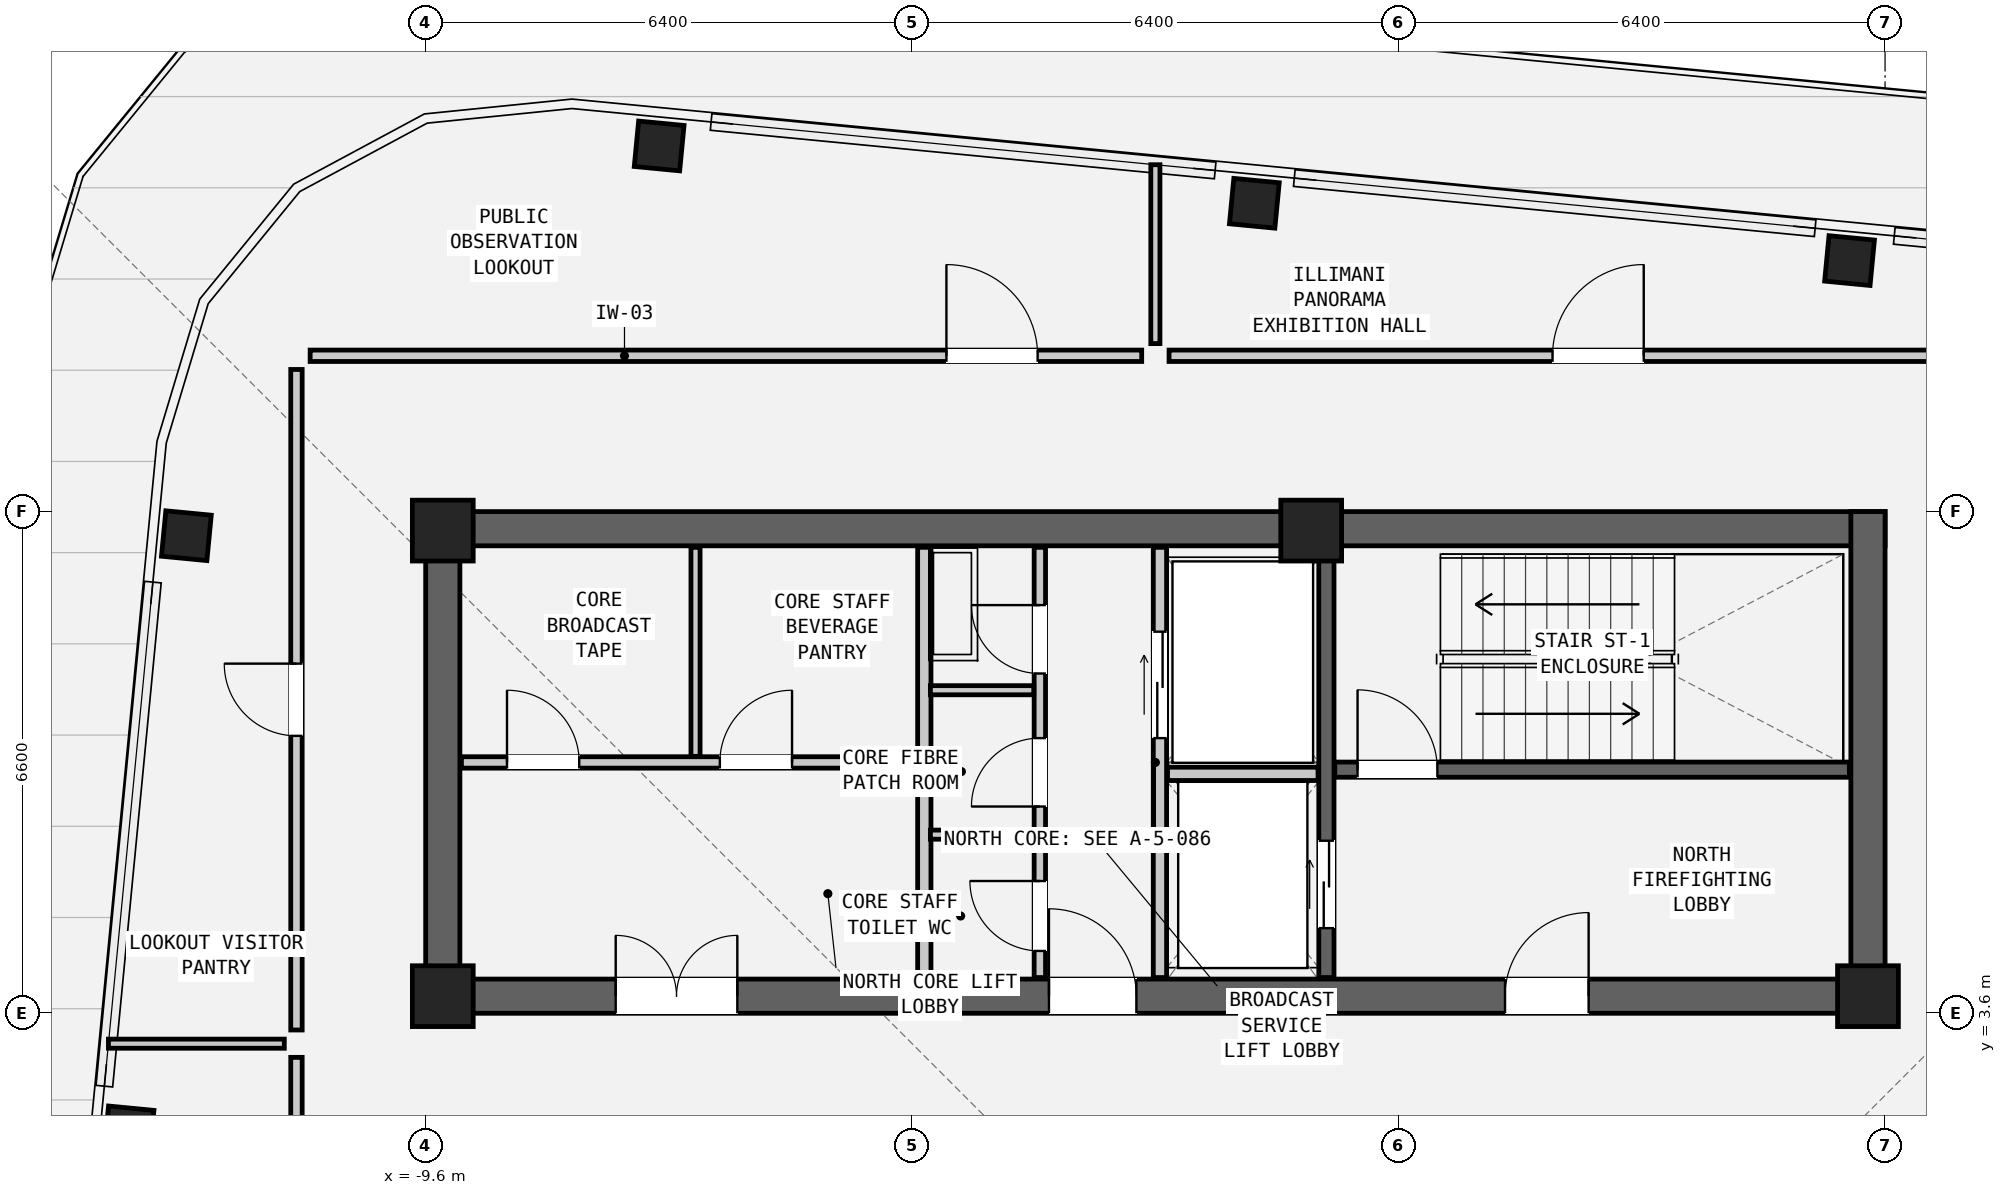
"""IFC4 building model, lengths in metres.
Left out: names, types, materials, properties, quantities, classifications, styles, units other than length and angle.
Written with IfcOpenShell. Run it as: python <this file> out.ifc"""

import sys

from ifc_helpers import new_model, si_unit, direction, frame, frame_2d, origin, origin_2d, place, context, subcontext, project, spatial, rectangle, hollow_rectangle, extrude, element, fill, save


model = new_model("IFC4")
c1 = context("Model", 3, precision=1e-05, world=origin(), true_north=direction((0.0, 1.0)))
c2 = subcontext(c1, "Body", "Model", "MODEL_VIEW")
j1 = project(units=[si_unit("LENGTHUNIT", "METRE"), si_unit("PLANEANGLEUNIT", "RADIAN")], contexts=[c1])
p1 = place(None, origin())
s1 = spatial("IfcSite", under=j1, at=p1, CompositionType="ELEMENT")
p2 = place(p1, origin())
s2 = spatial("IfcBuilding", under=s1, at=p2, CompositionType="ELEMENT")
p3 = place(p2, frame((0.0, 0.0, 280.55)))
s3 = spatial("IfcBuildingStorey", under=s2, at=p3, CompositionType="ELEMENT", Elevation=280.55)
p4 = place(p3, frame((-9.6, 9.975, 0.0), z_axis=(0.0, 0.0, 1.0), x_axis=(1.0, 0.0, 0.0)))
e1 = element("IfcWall", 1, at=p4, inside=s3, PredefinedType="SHEAR", context=c2, shape_type="SweptSolid", body=[
    extrude(rectangle(XDim=19.2, YDim=0.45, at=frame_2d((9.6, 0.0))), origin(), (0.0, 0.0, 1.0), 4.35),
])
p5 = place(p3, frame((-9.6, 3.825, 0.0), z_axis=(0.0, 0.0, 1.0), x_axis=(1.0, 0.0, 0.0)))
e2 = element("IfcWall", 2, at=p5, inside=s3, PredefinedType="SHEAR", context=c2, shape_type="SweptSolid", body=[
    extrude(rectangle(XDim=19.2, YDim=0.45, at=frame_2d((9.6, 0.0))), origin(), (0.0, 0.0, 1.0), 4.35),
])
p6 = place(p5, frame((14.2, 0.0, 0.0)))
e3 = element("IfcOpeningElement", 3, at=p6, cuts=e2, PredefinedType="OPENING", context=c2, shape_type="SweptSolid", body=[
    extrude(rectangle(XDim=1.1, YDim=2.08, at=frame_2d((0.55, 1.04))), frame((0.0, 0.237, 0.0), z_axis=(0.0, -1.0, 0.0), x_axis=(1.0, 0.0, 0.0)), (0.0, 0.0, 1.0), 0.474),
])
p7 = place(p5, frame((8.2, 0.0, 0.0)))
e4 = element("IfcOpeningElement", 4, at=p7, cuts=e2, PredefinedType="OPENING", context=c2, shape_type="SweptSolid", body=[
    extrude(rectangle(XDim=1.15, YDim=2.1, at=frame_2d((0.575, 1.05))), frame((0.0, 0.237, 0.0), z_axis=(0.0, -1.0, 0.0), x_axis=(1.0, 0.0, 0.0)), (0.0, 0.0, 1.0), 0.474),
])
p8 = place(p5, frame((2.5, 0.0, 0.0)))
e5 = element("IfcOpeningElement", 5, at=p8, cuts=e2, PredefinedType="OPENING", context=c2, shape_type="SweptSolid", body=[
    extrude(rectangle(XDim=1.6, YDim=2.12, at=frame_2d((0.8, 1.06))), frame((0.0, 0.237, 0.0), z_axis=(0.0, -1.0, 0.0), x_axis=(1.0, 0.0, 0.0)), (0.0, 0.0, 1.0), 0.474),
])
for number, where, z_axis, x_axis in (
    (6, (-9.375, 3.6, 0.0), (0.0, 0.0, 1.0), (0.0, 1.0, 0.0)),
    (7, (9.375, 3.6, 0.0), (0.0, 0.0, 1.0), (0.0, 1.0, 0.0)),
):
    element("IfcWall", number, at=place(p3, frame(where, z_axis=z_axis, x_axis=x_axis)), inside=s3, PredefinedType="SHEAR", context=c2, shape_type="SweptSolid", body=[
        extrude(rectangle(XDim=6.6, YDim=0.45, at=frame_2d((3.3, 0.0))), origin(), (0.0, 0.0, 1.0), 4.35),
    ])
for number, where, z_axis, x_axis in (
    (8, (9.133, 13.502, 0.0), (0.0, 0.0, 1.0), (0.995, -0.096, 0.0)),
    (9, (1.302, 14.256, 0.0), (0.0, 0.0, 1.0), (0.995, -0.096, 0.0)),
    (10, (-6.528, 15.01, 0.0), (0.0, 0.0, 1.0), (0.995, -0.096, 0.0)),
    (11, (-12.749, 9.883, 0.0), (0.0, 0.0, 1.0), (0.096, 0.995, 0.0)),
    (12, (-13.502, 2.052, 0.0), (0.0, 0.0, 1.0), (0.096, 0.995, 0.0)),
):
    element("IfcColumn", number, at=place(p3, frame(where, z_axis=z_axis, x_axis=x_axis)), inside=s3, PredefinedType="COLUMN", context=c2, shape_type="SweptSolid", body=[
        extrude(hollow_rectangle(XDim=0.6, YDim=0.6, WallThickness=0.04, at=origin_2d()), origin(), (0.0, 0.0, 1.0), 4.35),
    ])
for number, where, z_axis, x_axis in (
    (13, (-9.375, 9.95, 0.0), (0.0, 0.0, 1.0), (1.0, 0.0, 0.0)),
    (14, (2.05, 9.95, 0.0), (0.0, 0.0, 1.0), (1.0, 0.0, 0.0)),
    (15, (-9.375, 3.825, 0.0), (0.0, 0.0, 1.0), (1.0, 0.0, 0.0)),
    (16, (9.375, 3.825, 0.0), (0.0, 0.0, 1.0), (1.0, 0.0, 0.0)),
):
    element("IfcColumn", number, at=place(p3, frame(where, z_axis=z_axis, x_axis=x_axis)), inside=s3, PredefinedType="COLUMN", context=c2, shape_type="SweptSolid", body=[
        extrude(rectangle(XDim=0.8, YDim=0.8, at=origin_2d()), origin(), (0.0, 0.0, 1.0), 4.35),
    ])
p9 = place(p3, frame((2.36, 6.805, 0.0), z_axis=(0.0, 0.0, 1.0), x_axis=(1.0, 0.0, 0.0)))
e17 = element("IfcWall", 17, at=p9, inside=s3, PredefinedType="SHEAR", context=c2, shape_type="SweptSolid", body=[
    extrude(rectangle(XDim=6.77, YDim=0.2, at=frame_2d((3.385, 0.0))), origin(), (0.0, 0.0, 1.0), 4.07),
])
p10 = place(p9, frame((0.3, 0.0, 0.0)))
e18 = element("IfcOpeningElement", 18, at=p10, cuts=e17, PredefinedType="OPENING", context=c2, shape_type="SweptSolid", body=[
    extrude(rectangle(XDim=1.05, YDim=2.08, at=frame_2d((0.525, 1.04))), frame((0.0, 0.112, 0.0), z_axis=(0.0, -1.0, 0.0), x_axis=(1.0, 0.0, 0.0)), (0.0, 0.0, 1.0), 0.224),
])
p11 = place(p3, frame((2.25, 4.07, 0.0), z_axis=(0.0, 0.0, 1.0), x_axis=(0.0, 1.0, 0.0)))
e19 = element("IfcWall", 19, at=p11, inside=s3, PredefinedType="SHEAR", context=c2, shape_type="SweptSolid", body=[
    extrude(rectangle(XDim=5.66, YDim=0.2, at=frame_2d((2.83, 0.0))), origin(), (0.0, 0.0, 1.0), 4.07),
])
p12 = place(p11, frame((0.65, 0.0, 0.0)))
e20 = element("IfcOpeningElement", 20, at=p12, cuts=e19, PredefinedType="OPENING", context=c2, shape_type="SweptSolid", body=[
    extrude(rectangle(XDim=1.15, YDim=2.08, at=frame_2d((0.575, 1.04))), frame((0.0, 0.112, 0.0), z_axis=(0.0, -1.0, 0.0), x_axis=(1.0, 0.0, 0.0)), (0.0, 0.0, 1.0), 0.224),
])
p13 = place(p3, frame((0.06, 4.07, 0.0), z_axis=(0.0, 0.0, 1.0), x_axis=(0.0, 1.0, 0.0)))
e21 = element("IfcWall", 21, at=p13, inside=s3, PredefinedType="PARTITIONING", context=c2, shape_type="SweptSolid", body=[
    extrude(rectangle(XDim=5.66, YDim=0.175, at=frame_2d((2.83, 0.0))), origin(), (0.0, 0.0, 1.0), 4.07),
])
p14 = place(p13, frame((3.15, 0.0, 0.0)))
e22 = element("IfcOpeningElement", 22, at=p14, cuts=e21, PredefinedType="OPENING", context=c2, shape_type="SweptSolid", body=[
    extrude(rectangle(XDim=1.4, YDim=2.12, at=frame_2d((0.7, 1.06))), frame((0.0, 0.1, 0.0), z_axis=(0.0, -1.0, 0.0), x_axis=(1.0, 0.0, 0.0)), (0.0, 0.0, 1.0), 0.199),
])
p15 = place(p3, frame((0.16, 6.75, 0.0), z_axis=(0.0, 0.0, 1.0), x_axis=(1.0, 0.0, 0.0)))
e23 = element("IfcWall", 23, at=p15, inside=s3, PredefinedType="PARTITIONING", context=c2, shape_type="SweptSolid", body=[
    extrude(rectangle(XDim=1.98, YDim=0.175, at=frame_2d((0.99, 0.0))), origin(), (0.0, 0.0, 1.0), 4.07),
])
p16 = place(p3, frame((-3.04, 4.07, 0.0), z_axis=(0.0, 0.0, 1.0), x_axis=(0.0, 1.0, 0.0)))
e24 = element("IfcWall", 24, at=p16, inside=s3, PredefinedType="PARTITIONING", context=c2, shape_type="SweptSolid", body=[
    extrude(rectangle(XDim=5.66, YDim=0.175, at=frame_2d((2.83, 0.0))), origin(), (0.0, 0.0, 1.0), 4.07),
])
p17 = place(p3, frame((-1.52, 4.07, 0.0), z_axis=(0.0, 0.0, 1.0), x_axis=(0.0, 1.0, 0.0)))
e25 = element("IfcWall", 25, at=p17, inside=s3, PredefinedType="PARTITIONING", context=c2, shape_type="SweptSolid", body=[
    extrude(rectangle(XDim=5.66, YDim=0.15, at=frame_2d((2.83, 0.0))), origin(), (0.0, 0.0, 1.0), 4.07),
])
p18 = place(p17, frame((4.0, 0.0, 0.0)))
e26 = element("IfcOpeningElement", 26, at=p18, cuts=e25, PredefinedType="OPENING", context=c2, shape_type="SweptSolid", body=[
    extrude(rectangle(XDim=0.9, YDim=2.05, at=frame_2d((0.45, 1.025))), frame((0.0, 0.087, 0.0), z_axis=(0.0, -1.0, 0.0), x_axis=(1.0, 0.0, 0.0)), (0.0, 0.0, 1.0), 0.174),
])
p19 = place(p17, frame((2.25, 0.0, 0.0)))
e27 = element("IfcOpeningElement", 27, at=p19, cuts=e25, PredefinedType="OPENING", context=c2, shape_type="SweptSolid", body=[
    extrude(rectangle(XDim=0.9, YDim=2.05, at=frame_2d((0.45, 1.025))), frame((0.0, 0.087, 0.0), z_axis=(0.0, -1.0, 0.0), x_axis=(1.0, 0.0, 0.0)), (0.0, 0.0, 1.0), 0.174),
])
p20 = place(p17, frame((0.35, 0.0, 0.0)))
e28 = element("IfcOpeningElement", 28, at=p20, cuts=e25, PredefinedType="OPENING", context=c2, shape_type="SweptSolid", body=[
    extrude(rectangle(XDim=0.92, YDim=2.1, at=frame_2d((0.46, 1.05))), frame((0.0, 0.087, 0.0), z_axis=(0.0, -1.0, 0.0), x_axis=(1.0, 0.0, 0.0)), (0.0, 0.0, 1.0), 0.174),
])
for number, where, z_axis, x_axis in (
    (29, (-2.96, 5.95, 0.0), (0.0, 0.0, 1.0), (1.0, 0.0, 0.0)),
    (30, (-2.96, 7.85, 0.0), (0.0, 0.0, 1.0), (1.0, 0.0, 0.0)),
):
    element("IfcWall", number, at=place(p3, frame(where, z_axis=z_axis, x_axis=x_axis)), inside=s3, PredefinedType="PARTITIONING", context=c2, shape_type="SweptSolid", body=[
        extrude(rectangle(XDim=1.36, YDim=0.12, at=frame_2d((0.68, 0.0))), origin(), (0.0, 0.0, 1.0), 4.07),
    ])
p21 = place(p3, frame((-9.13, 6.9, 0.0), z_axis=(0.0, 0.0, 1.0), x_axis=(1.0, 0.0, 0.0)))
e31 = element("IfcWall", 31, at=p21, inside=s3, PredefinedType="PARTITIONING", context=c2, shape_type="SweptSolid", body=[
    extrude(rectangle(XDim=6.01, YDim=0.15, at=frame_2d((3.005, 0.0))), origin(), (0.0, 0.0, 1.0), 4.07),
])
p22 = place(p21, frame((0.6, 0.0, 0.0)))
e32 = element("IfcOpeningElement", 32, at=p22, cuts=e31, PredefinedType="OPENING", context=c2, shape_type="SweptSolid", body=[
    extrude(rectangle(XDim=0.95, YDim=2.1, at=frame_2d((0.475, 1.05))), frame((0.0, 0.087, 0.0), z_axis=(0.0, -1.0, 0.0), x_axis=(1.0, 0.0, 0.0)), (0.0, 0.0, 1.0), 0.174),
])
p23 = place(p21, frame((3.4, 0.0, 0.0)))
e33 = element("IfcOpeningElement", 33, at=p23, cuts=e31, PredefinedType="OPENING", context=c2, shape_type="SweptSolid", body=[
    extrude(rectangle(XDim=0.95, YDim=2.1, at=frame_2d((0.475, 1.05))), frame((0.0, 0.087, 0.0), z_axis=(0.0, -1.0, 0.0), x_axis=(1.0, 0.0, 0.0)), (0.0, 0.0, 1.0), 0.174),
])
p24 = place(p3, frame((-6.05, 6.98, 0.0), z_axis=(0.0, 0.0, 1.0), x_axis=(0.0, 1.0, 0.0)))
e34 = element("IfcWall", 34, at=p24, inside=s3, PredefinedType="PARTITIONING", context=c2, shape_type="SweptSolid", body=[
    extrude(rectangle(XDim=2.75, YDim=0.12, at=frame_2d((1.375, 0.0))), origin(), (0.0, 0.0, 1.0), 4.07),
])
p25 = place(p3, frame((0.0, 12.41, 0.0), z_axis=(0.0, 0.0, 1.0), x_axis=(0.0, 1.0, 0.0)))
e35 = element("IfcWall", 35, at=p25, inside=s3, PredefinedType="PARTITIONING", context=c2, shape_type="SweptSolid", body=[
    extrude(rectangle(XDim=2.354, YDim=0.12, at=frame_2d((1.177, 0.0))), origin(), (0.0, 0.0, 1.0), 2.25),
])
p26 = place(p3, frame((-13.774, 3.2, 0.0), z_axis=(0.0, 0.0, 1.0), x_axis=(1.0, 0.0, 0.0)))
e36 = element("IfcWall", 36, at=p26, inside=s3, PredefinedType="PARTITIONING", context=c2, shape_type="SweptSolid", body=[
    extrude(rectangle(XDim=2.314, YDim=0.12, at=frame_2d((1.157, 0.0))), origin(), (0.0, 0.0, 1.0), 4.07),
])
p27 = place(p3, frame((-11.12, 12.25, 0.0), z_axis=(0.0, 0.0, 1.0), x_axis=(1.0, 0.0, 0.0)))
e37 = element("IfcWall", 37, at=p27, inside=s3, PredefinedType="PARTITIONING", context=c2, shape_type="SweptSolid", body=[
    extrude(rectangle(XDim=10.94, YDim=0.15, at=frame_2d((5.47, 0.0))), origin(), (0.0, 0.0, 1.0), 4.07),
])
p28 = place(p27, frame((8.371, 0.0, 0.0)))
e38 = element("IfcOpeningElement", 38, at=p28, cuts=e37, PredefinedType="OPENING", context=c2, shape_type="SweptSolid", body=[
    extrude(rectangle(XDim=1.2, YDim=2.1, at=frame_2d((0.6, 1.05))), frame((0.0, 0.087, 0.0), z_axis=(0.0, -1.0, 0.0), x_axis=(1.0, 0.0, 0.0)), (0.0, 0.0, 1.0), 0.174),
])
p29 = place(p3, frame((0.18, 12.25, 0.0), z_axis=(0.0, 0.0, 1.0), x_axis=(1.0, 0.0, 0.0)))
e39 = element("IfcWall", 39, at=p29, inside=s3, PredefinedType="PARTITIONING", context=c2, shape_type="SweptSolid", body=[
    extrude(rectangle(XDim=11.29, YDim=0.15, at=frame_2d((5.645, 0.0))), origin(), (0.0, 0.0, 1.0), 2.25),
])
p30 = place(p29, frame((5.045, 0.0, 0.0)))
e40 = element("IfcOpeningElement", 40, at=p30, cuts=e39, PredefinedType="OPENING", context=c2, shape_type="SweptSolid", body=[
    extrude(rectangle(XDim=1.2, YDim=2.1, at=frame_2d((0.6, 1.05))), frame((0.0, 0.087, 0.0), z_axis=(0.0, -1.0, 0.0), x_axis=(1.0, 0.0, 0.0)), (0.0, 0.0, 1.0), 0.174),
])
p31 = place(p3, frame((-11.3, -2.82, 0.0), z_axis=(0.0, 0.0, 1.0), x_axis=(0.0, 1.0, 0.0)))
e41 = element("IfcWall", 41, at=p31, inside=s3, PredefinedType="PARTITIONING", context=c2, shape_type="SweptSolid", body=[
    extrude(rectangle(XDim=5.84, YDim=0.15, at=frame_2d((2.92, 0.0))), origin(), (0.0, 0.0, 1.0), 4.07),
])
p32 = place(p31, frame((2.32, 0.0, 0.0)))
e42 = element("IfcOpeningElement", 42, at=p32, cuts=e41, PredefinedType="OPENING", context=c2, shape_type="SweptSolid", body=[
    extrude(rectangle(XDim=1.2, YDim=2.1, at=frame_2d((0.6, 1.05))), frame((0.0, 0.087, 0.0), z_axis=(0.0, -1.0, 0.0), x_axis=(1.0, 0.0, 0.0)), (0.0, 0.0, 1.0), 0.174),
])
p33 = place(p3, frame((-11.3, 3.38, 0.0), z_axis=(0.0, 0.0, 1.0), x_axis=(0.0, 1.0, 0.0)))
e43 = element("IfcWall", 43, at=p33, inside=s3, PredefinedType="PARTITIONING", context=c2, shape_type="SweptSolid", body=[
    extrude(rectangle(XDim=8.69, YDim=0.15, at=frame_2d((4.345, 0.0))), origin(), (0.0, 0.0, 1.0), 4.07),
])
p34 = place(p33, frame((3.87, 0.0, 0.0)))
e44 = element("IfcOpeningElement", 44, at=p34, cuts=e43, PredefinedType="OPENING", context=c2, shape_type="SweptSolid", body=[
    extrude(rectangle(XDim=0.95, YDim=2.1, at=frame_2d((0.475, 1.05))), frame((0.0, 0.087, 0.0), z_axis=(0.0, -1.0, 0.0), x_axis=(1.0, 0.0, 0.0)), (0.0, 0.0, 1.0), 0.174),
])
p35 = place(p10, origin())
e45 = element("IfcDoor", 45, at=p35, inside=s3, OperationType="SINGLE_SWING_LEFT", PredefinedType="DOOR", context=c2, shape_type="SweptSolid", body=[
    extrude(rectangle(XDim=1.05, YDim=2.08, at=frame_2d((0.525, 1.04))), frame((0.0, 0.025, 0.0), z_axis=(0.0, -1.0, 0.0), x_axis=(1.0, 0.0, 0.0)), (0.0, 0.0, 1.0), 0.05),
])
fill(e18, e45)
p36 = place(p6, origin())
e46 = element("IfcDoor", 46, at=p36, inside=s3, OperationType="SINGLE_SWING_RIGHT", PredefinedType="DOOR", context=c2, shape_type="SweptSolid", body=[
    extrude(rectangle(XDim=1.1, YDim=2.08, at=frame_2d((0.55, 1.04))), frame((0.0, 0.025, 0.0), z_axis=(0.0, -1.0, 0.0), x_axis=(1.0, 0.0, 0.0)), (0.0, 0.0, 1.0), 0.05),
])
fill(e3, e46)
p37 = place(p12, origin())
e47 = element("IfcDoor", 47, at=p37, inside=s3, OperationType="DOUBLE_DOOR_SLIDING", PredefinedType="DOOR", context=c2, shape_type="SweptSolid", body=[
    extrude(rectangle(XDim=1.15, YDim=2.08, at=frame_2d((0.575, 1.04))), frame((0.0, 0.025, 0.0), z_axis=(0.0, -1.0, 0.0), x_axis=(1.0, 0.0, 0.0)), (0.0, 0.0, 1.0), 0.05),
])
fill(e20, e47)
p38 = place(p14, origin())
e48 = element("IfcDoor", 48, at=p38, inside=s3, OperationType="DOUBLE_DOOR_SLIDING", PredefinedType="DOOR", context=c2, shape_type="SweptSolid", body=[
    extrude(rectangle(XDim=1.4, YDim=2.12, at=frame_2d((0.7, 1.06))), frame((0.0, 0.025, 0.0), z_axis=(0.0, -1.0, 0.0), x_axis=(1.0, 0.0, 0.0)), (0.0, 0.0, 1.0), 0.05),
])
fill(e22, e48)
p39 = place(p7, origin())
e49 = element("IfcDoor", 49, at=p39, inside=s3, OperationType="SINGLE_SWING_LEFT", PredefinedType="DOOR", context=c2, shape_type="SweptSolid", body=[
    extrude(rectangle(XDim=1.15, YDim=2.1, at=frame_2d((0.575, 1.05))), frame((0.0, 0.025, 0.0), z_axis=(0.0, -1.0, 0.0), x_axis=(1.0, 0.0, 0.0)), (0.0, 0.0, 1.0), 0.05),
])
fill(e4, e49)
p40 = place(p18, origin())
e50 = element("IfcDoor", 50, at=p40, inside=s3, OperationType="SINGLE_SWING_RIGHT", PredefinedType="DOOR", context=c2, shape_type="SweptSolid", body=[
    extrude(rectangle(XDim=0.9, YDim=2.05, at=frame_2d((0.45, 1.025))), frame((0.0, 0.025, 0.0), z_axis=(0.0, -1.0, 0.0), x_axis=(1.0, 0.0, 0.0)), (0.0, 0.0, 1.0), 0.05),
])
fill(e26, e50)
p41 = place(p19, origin())
e51 = element("IfcDoor", 51, at=p41, inside=s3, OperationType="SINGLE_SWING_LEFT", PredefinedType="DOOR", context=c2, shape_type="SweptSolid", body=[
    extrude(rectangle(XDim=0.9, YDim=2.05, at=frame_2d((0.45, 1.025))), frame((0.0, 0.025, 0.0), z_axis=(0.0, -1.0, 0.0), x_axis=(1.0, 0.0, 0.0)), (0.0, 0.0, 1.0), 0.05),
])
fill(e27, e51)
p42 = place(p20, origin())
e52 = element("IfcDoor", 52, at=p42, inside=s3, OperationType="SINGLE_SWING_RIGHT", PredefinedType="DOOR", context=c2, shape_type="SweptSolid", body=[
    extrude(rectangle(XDim=0.92, YDim=2.1, at=frame_2d((0.46, 1.05))), frame((0.0, 0.025, 0.0), z_axis=(0.0, -1.0, 0.0), x_axis=(1.0, 0.0, 0.0)), (0.0, 0.0, 1.0), 0.05),
])
fill(e28, e52)
p43 = place(p8, origin())
e53 = element("IfcDoor", 53, at=p43, inside=s3, OperationType="DOUBLE_DOOR_SINGLE_SWING", PredefinedType="DOOR", context=c2, shape_type="SweptSolid", body=[
    extrude(rectangle(XDim=1.6, YDim=2.12, at=frame_2d((0.8, 1.06))), frame((0.0, 0.025, 0.0), z_axis=(0.0, -1.0, 0.0), x_axis=(1.0, 0.0, 0.0)), (0.0, 0.0, 1.0), 0.05),
])
fill(e5, e53)
p44 = place(p22, origin())
e54 = element("IfcDoor", 54, at=p44, inside=s3, OperationType="SINGLE_SWING_LEFT", PredefinedType="DOOR", context=c2, shape_type="SweptSolid", body=[
    extrude(rectangle(XDim=0.95, YDim=2.1, at=frame_2d((0.475, 1.05))), frame((0.0, 0.025, 0.0), z_axis=(0.0, -1.0, 0.0), x_axis=(1.0, 0.0, 0.0)), (0.0, 0.0, 1.0), 0.05),
])
fill(e32, e54)
p45 = place(p23, origin())
e55 = element("IfcDoor", 55, at=p45, inside=s3, OperationType="SINGLE_SWING_RIGHT", PredefinedType="DOOR", context=c2, shape_type="SweptSolid", body=[
    extrude(rectangle(XDim=0.95, YDim=2.1, at=frame_2d((0.475, 1.05))), frame((0.0, 0.025, 0.0), z_axis=(0.0, -1.0, 0.0), x_axis=(1.0, 0.0, 0.0)), (0.0, 0.0, 1.0), 0.05),
])
fill(e33, e55)
p46 = place(p28, origin())
e56 = element("IfcDoor", 56, at=p46, inside=s3, OperationType="SINGLE_SWING_LEFT", PredefinedType="DOOR", context=c2, shape_type="SweptSolid", body=[
    extrude(rectangle(XDim=1.2, YDim=2.1, at=frame_2d((0.6, 1.05))), frame((0.0, 0.025, 0.0), z_axis=(0.0, -1.0, 0.0), x_axis=(1.0, 0.0, 0.0)), (0.0, 0.0, 1.0), 0.05),
])
fill(e38, e56)
p47 = place(p30, origin())
e57 = element("IfcDoor", 57, at=p47, inside=s3, OperationType="SINGLE_SWING_RIGHT", PredefinedType="DOOR", context=c2, shape_type="SweptSolid", body=[
    extrude(rectangle(XDim=1.2, YDim=2.1, at=frame_2d((0.6, 1.05))), frame((0.0, 0.025, 0.0), z_axis=(0.0, -1.0, 0.0), x_axis=(1.0, 0.0, 0.0)), (0.0, 0.0, 1.0), 0.05),
])
fill(e40, e57)
p48 = place(p34, origin())
e58 = element("IfcDoor", 58, at=p48, inside=s3, OperationType="SINGLE_SWING_RIGHT", PredefinedType="DOOR", context=c2, shape_type="SweptSolid", body=[
    extrude(rectangle(XDim=0.95, YDim=2.1, at=frame_2d((0.475, 1.05))), frame((0.0, 0.025, 0.0), z_axis=(0.0, -1.0, 0.0), x_axis=(1.0, 0.0, 0.0)), (0.0, 0.0, 1.0), 0.05),
])
fill(e44, e58)
save(model, sys.argv[1])
